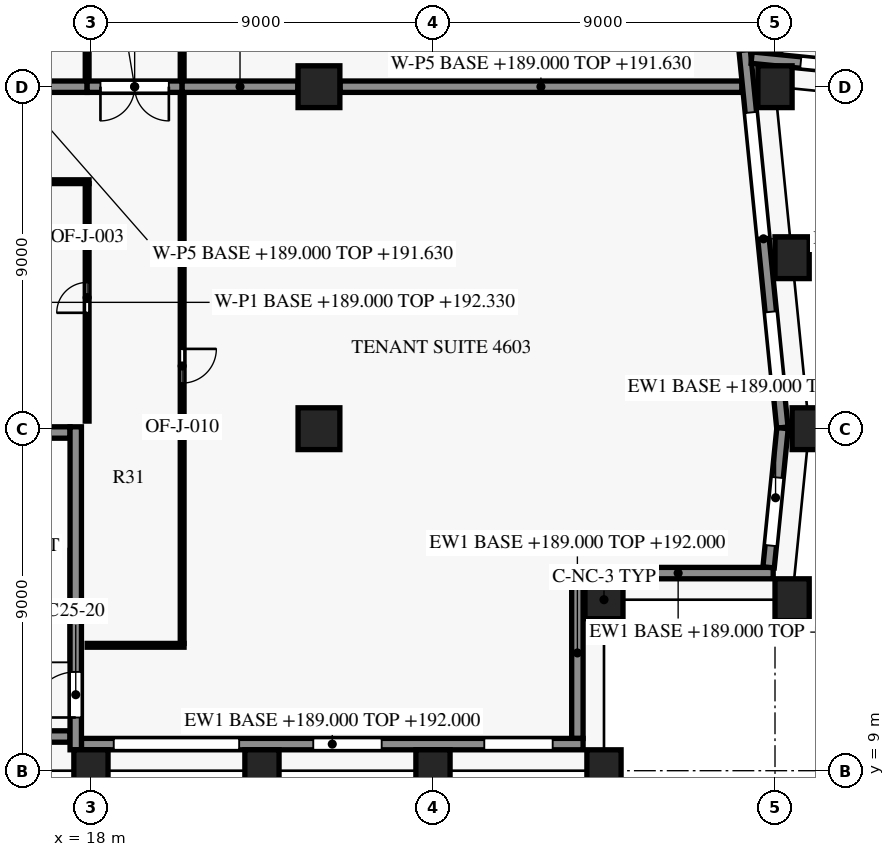
"""IFC4 building model, lengths in metres.
Left out: names, types, materials, properties, quantities, classifications, styles, units other than length and angle.
Written with IfcOpenShell. Run it as: python <this file> out.ifc"""

import sys

from ifc_helpers import new_model, si_unit, direction, frame, frame_2d, origin, origin_2d, place, context, subcontext, project, spatial, rectangle, extrude, element, fill, save


model = new_model("IFC4")
c1 = context("Model", 3, precision=1e-05, world=origin(), true_north=direction((0.0, 1.0)))
c2 = subcontext(c1, "Body", "Model", "MODEL_VIEW")
j1 = project(units=[si_unit("LENGTHUNIT", "METRE"), si_unit("PLANEANGLEUNIT", "RADIAN")], contexts=[c1])
p1 = place(None, origin())
s1 = spatial("IfcSite", under=j1, at=p1, CompositionType="ELEMENT")
p2 = place(p1, origin())
s2 = spatial("IfcBuilding", under=s1, at=p2, CompositionType="ELEMENT")
p3 = place(p2, frame((0.0, 0.0, 189.0)))
s3 = spatial("IfcBuildingStorey", under=s2, at=p3, CompositionType="ELEMENT", Elevation=189.0)
for number, where, z_axis, x_axis in (
    (1, (18.0, 9.0, 0.0), (0.0, 0.0, 1.0), (1.0, 0.0, 0.0)),
    (2, (22.5, 9.0, 0.0), (0.0, 0.0, 1.0), (1.0, 0.0, 0.0)),
    (3, (27.0, 9.0, 0.0), (0.0, 0.0, 1.0), (1.0, 0.0, 0.0)),
    (4, (31.5, 9.0, 0.0), (0.0, 0.0, 1.0), (1.0, 0.0, 0.0)),
    (5, (36.45, 13.5, 0.0), (0.0, 0.0, 1.0), (0.1, 0.995, 0.0)),
    (6, (36.9, 18.0, 0.0), (0.0, 0.0, 1.0), (0.0, 1.0, 0.0)),
    (7, (36.45, 22.5, 0.0), (0.0, 0.0, 1.0), (-0.1, 0.995, 0.0)),
    (8, (36.0, 27.0, 0.0), (0.0, 0.0, 1.0), (-0.1, 0.995, 0.0)),
):
    element("IfcColumn", number, at=place(p3, frame(where, z_axis=z_axis, x_axis=x_axis)), inside=s3, PredefinedType="COLUMN", context=c2, shape_type="SweptSolid", body=[
        extrude(rectangle(XDim=0.9, YDim=1.1, at=origin_2d()), origin(), (0.0, 0.0, 1.0), 3.8),
    ])
p4 = place(p3, frame((31.5, 13.5, 0.0), z_axis=(0.0, 0.0, 1.0), x_axis=(1.0, 0.0, 0.0)))
e9 = element("IfcColumn", 9, at=p4, inside=s3, PredefinedType="COLUMN", context=c2, shape_type="SweptSolid", body=[
    extrude(rectangle(XDim=1.0, YDim=1.0, at=origin_2d()), origin(), (0.0, 0.0, 1.0), 3.8),
])
for number, where, z_axis, x_axis in (
    (10, (24.0, 18.0, 0.0), (0.0, 0.0, 1.0), (1.0, 0.0, 0.0)),
    (11, (24.0, 27.0, 0.0), (0.0, 0.0, 1.0), (1.0, 0.0, 0.0)),
):
    element("IfcColumn", number, at=place(p3, frame(where, z_axis=z_axis, x_axis=x_axis)), inside=s3, PredefinedType="COLUMN", context=c2, shape_type="SweptSolid", body=[
        extrude(rectangle(XDim=1.1, YDim=1.1, at=origin_2d()), origin(), (0.0, 0.0, 1.0), 3.8),
    ])
p5 = place(p3, frame((30.95, 9.7, 0.0), z_axis=(0.0, 0.0, 1.0), x_axis=(-1.0, 0.0, 0.0)))
e12 = element("IfcWall", 12, at=p5, inside=s3, PredefinedType="SOLIDWALL", context=c2, shape_type="SweptSolid", body=[
    extrude(rectangle(XDim=13.2, YDim=0.3, at=frame_2d((6.6, 0.0))), origin(), (0.0, 0.0, 1.0), 3.0),
])
p6 = place(p5, frame((0.8, 0.0, 0.75)))
e13 = element("IfcOpeningElement", 13, at=p6, cuts=e12, PredefinedType="OPENING", context=c2, shape_type="SweptSolid", body=[
    extrude(rectangle(XDim=1.8, YDim=1.8, at=frame_2d((0.9, 0.9))), frame((0.0, 0.16, 0.0), z_axis=(0.0, -1.0, 0.0), x_axis=(1.0, 0.0, 0.0)), (0.0, 0.0, 1.0), 0.32),
])
p7 = place(p5, frame((5.3, 0.0, 0.75)))
e14 = element("IfcOpeningElement", 14, at=p7, cuts=e12, PredefinedType="OPENING", context=c2, shape_type="SweptSolid", body=[
    extrude(rectangle(XDim=1.8, YDim=1.8, at=frame_2d((0.9, 0.9))), frame((0.0, 0.16, 0.0), z_axis=(0.0, -1.0, 0.0), x_axis=(1.0, 0.0, 0.0)), (0.0, 0.0, 1.0), 0.32),
])
p8 = place(p5, frame((9.05, 0.0, 0.15)))
e15 = element("IfcOpeningElement", 15, at=p8, cuts=e12, PredefinedType="OPENING", context=c2, shape_type="SweptSolid", body=[
    extrude(rectangle(XDim=3.3, YDim=2.4, at=frame_2d((1.65, 1.2))), frame((0.0, 0.16, 0.0), z_axis=(0.0, -1.0, 0.0), x_axis=(1.0, 0.0, 0.0)), (0.0, 0.0, 1.0), 0.32),
])
p9 = place(p3, frame((30.8, 14.35, 0.0), z_axis=(0.0, 0.0, 1.0), x_axis=(0.0, -1.0, 0.0)))
e16 = element("IfcWall", 16, at=p9, inside=s3, PredefinedType="SOLIDWALL", context=c2, shape_type="SweptSolid", body=[
    extrude(rectangle(XDim=4.502, YDim=0.3, at=frame_2d((2.251, 0.0))), origin(), (0.0, 0.0, 1.0), 3.0),
])
p10 = place(p3, frame((35.952, 14.2, 0.0), z_axis=(0.0, 0.0, 1.0), x_axis=(-1.0, 0.0, 0.0)))
e17 = element("IfcWall", 17, at=p10, inside=s3, PredefinedType="SOLIDWALL", context=c2, shape_type="SweptSolid", body=[
    extrude(rectangle(XDim=5.002, YDim=0.3, at=frame_2d((2.501, 0.0))), origin(), (0.0, 0.0, 1.0), 3.0),
])
p11 = place(p3, frame((36.198, 18.015, 0.0), z_axis=(0.0, 0.0, 1.0), x_axis=(-0.099529980022, -0.99503456376, 0.0)))
e18 = element("IfcWall", 18, at=p11, inside=s3, PredefinedType="SOLIDWALL", context=c2, shape_type="SweptSolid", body=[
    extrude(rectangle(XDim=3.682, YDim=0.3, at=frame_2d((1.841, 0.0))), origin(), (0.0, 0.0, 1.0), 3.0),
])
p12 = place(p11, frame((1.306, 0.0, 0.75)))
e19 = element("IfcOpeningElement", 19, at=p12, cuts=e18, PredefinedType="OPENING", context=c2, shape_type="SweptSolid", body=[
    extrude(rectangle(XDim=1.8, YDim=1.8, at=frame_2d((0.9, 0.9))), frame((0.0, 0.16, 0.0), z_axis=(0.0, -1.0, 0.0), x_axis=(1.0, 0.0, 0.0)), (0.0, 0.0, 1.0), 0.32),
])
p13 = place(p3, frame((35.2, 27.964, 0.0), z_axis=(0.0, 0.0, 1.0), x_axis=(0.099501297882, -0.995037432321, 0.0)))
e20 = element("IfcWall", 20, at=p13, inside=s3, PredefinedType="SOLIDWALL", context=c2, shape_type="SweptSolid", body=[
    extrude(rectangle(XDim=9.984, YDim=0.3, at=frame_2d((4.992, 0.0))), origin(), (0.0, 0.0, 1.0), 3.0),
])
p14 = place(p13, frame((1.65, 0.0, 0.15)))
e21 = element("IfcOpeningElement", 21, at=p14, cuts=e20, PredefinedType="OPENING", context=c2, shape_type="SweptSolid", body=[
    extrude(rectangle(XDim=3.3, YDim=2.4, at=frame_2d((1.65, 1.2))), frame((0.0, 0.16, 0.0), z_axis=(0.0, -1.0, 0.0), x_axis=(1.0, 0.0, 0.0)), (0.0, 0.0, 1.0), 0.32),
])
p15 = place(p13, frame((6.923, 0.0, 0.75)))
e22 = element("IfcOpeningElement", 22, at=p15, cuts=e20, PredefinedType="OPENING", context=c2, shape_type="SweptSolid", body=[
    extrude(rectangle(XDim=1.8, YDim=1.8, at=frame_2d((0.9, 0.9))), frame((0.0, 0.16, 0.0), z_axis=(0.0, -1.0, 0.0), x_axis=(1.0, 0.0, 0.0)), (0.0, 0.0, 1.0), 0.32),
])
p16 = place(p3, frame((45.015, 26.802, 0.0), z_axis=(0.0, 0.0, 1.0), x_axis=(-0.995037689759, 0.099498723402, 0.0)))
e23 = element("IfcWall", 23, at=p16, inside=s3, PredefinedType="SOLIDWALL", context=c2, shape_type="SweptSolid", body=[
    extrude(rectangle(XDim=9.677, YDim=0.3, at=frame_2d((4.839, 0.0))), origin(), (0.0, 0.0, 1.0), 3.0),
])
p17 = place(p16, frame((1.306, 0.0, 0.75)))
e24 = element("IfcOpeningElement", 24, at=p17, cuts=e23, PredefinedType="OPENING", context=c2, shape_type="SweptSolid", body=[
    extrude(rectangle(XDim=1.8, YDim=1.8, at=frame_2d((0.9, 0.9))), frame((0.0, 0.16, 0.0), z_axis=(0.0, -1.0, 0.0), x_axis=(1.0, 0.0, 0.0)), (0.0, 0.0, 1.0), 0.32),
])
p18 = place(p16, frame((5.079, 0.0, 0.15)))
e25 = element("IfcOpeningElement", 25, at=p18, cuts=e23, PredefinedType="OPENING", context=c2, shape_type="SweptSolid", body=[
    extrude(rectangle(XDim=3.3, YDim=2.4, at=frame_2d((1.65, 1.2))), frame((0.0, 0.16, 0.0), z_axis=(0.0, -1.0, 0.0), x_axis=(1.0, 0.0, 0.0)), (0.0, 0.0, 1.0), 0.32),
])
for number, where, z_axis, x_axis in (
    (26, (14.15, 9.9, 0.0), (0.0, 0.0, 1.0), (1.0, 0.0, 0.0)),
    (27, (14.15, 17.9, 0.0), (0.0, 0.0, 1.0), (1.0, 0.0, 0.0)),
):
    element("IfcWall", number, at=place(p3, frame(where, z_axis=z_axis, x_axis=x_axis)), inside=s3, PredefinedType="SHEAR", context=c2, shape_type="SweptSolid", body=[
        extrude(rectangle(XDim=3.3, YDim=0.3, at=frame_2d((1.65, 0.0))), origin(), (0.0, 0.0, 1.0), 3.5),
    ])
p19 = place(p3, frame((17.6, 9.55, 0.0), z_axis=(0.0, 0.0, 1.0), x_axis=(0.0, 1.0, 0.0)))
e28 = element("IfcWall", 28, at=p19, inside=s3, PredefinedType="SHEAR", context=c2, shape_type="SweptSolid", body=[
    extrude(rectangle(XDim=8.5, YDim=0.3, at=frame_2d((4.25, 0.0))), origin(), (0.0, 0.0, 1.0), 3.5),
])
p20 = place(p19, frame((0.85, 0.0, 0.0)))
e29 = element("IfcOpeningElement", 29, at=p20, cuts=e28, PredefinedType="OPENING", context=c2, shape_type="SweptSolid", body=[
    extrude(rectangle(XDim=1.2, YDim=2.2, at=frame_2d((0.6, 1.1))), frame((0.0, 0.16, 0.0), z_axis=(0.0, -1.0, 0.0), x_axis=(1.0, 0.0, 0.0)), (0.0, 0.0, 1.0), 0.32),
])
p21 = place(p3, frame((20.45, 12.3, 0.0), z_axis=(0.0, 0.0, 1.0), x_axis=(-1.0, 0.0, 0.0)))
e30 = element("IfcWall", 30, at=p21, inside=s3, PredefinedType="PARTITIONING", context=c2, shape_type="SweptSolid", body=[
    extrude(rectangle(XDim=2.55, YDim=0.1, at=frame_2d((1.275, 0.0))), origin(), (0.0, 0.0, 1.0), 2.63),
])
p22 = place(p3, frame((17.9, 18.2, 0.0), z_axis=(0.0, 0.0, 1.0), x_axis=(0.0, 1.0, 0.0)))
e31 = element("IfcWall", 31, at=p22, inside=s3, PredefinedType="PARTITIONING", context=c2, shape_type="SweptSolid", body=[
    extrude(rectangle(XDim=6.25, YDim=0.1, at=frame_2d((3.125, 0.0))), origin(), (0.0, 0.0, 1.0), 2.63),
])
p23 = place(p22, frame((2.85, 0.0, 0.0)))
e32 = element("IfcOpeningElement", 32, at=p23, cuts=e31, PredefinedType="OPENING", context=c2, shape_type="SweptSolid", body=[
    extrude(rectangle(XDim=0.8, YDim=2.1, at=frame_2d((0.4, 1.05))), frame((0.0, 0.06, 0.0), z_axis=(0.0, -1.0, 0.0), x_axis=(1.0, 0.0, 0.0)), (0.0, 0.0, 1.0), 0.12),
])
p24 = place(p3, frame((17.95, 24.5, 0.0), z_axis=(0.0, 0.0, 1.0), x_axis=(-1.0, 0.0, 0.0)))
e33 = element("IfcWall", 33, at=p24, inside=s3, PredefinedType="PARTITIONING", context=c2, shape_type="SweptSolid", body=[
    extrude(rectangle(XDim=4.0, YDim=0.1, at=frame_2d((2.0, 0.0))), origin(), (0.0, 0.0, 1.0), 2.63),
])
p25 = place(p3, frame((20.4, 26.83, 0.0), z_axis=(0.0, 0.0, 1.0), x_axis=(0.0, -1.0, 0.0)))
e34 = element("IfcWall", 34, at=p25, inside=s3, PredefinedType="PARTITIONING", context=c2, shape_type="SweptSolid", body=[
    extrude(rectangle(XDim=14.48, YDim=0.1, at=frame_2d((7.24, 0.0))), origin(), (0.0, 0.0, 1.0), 2.63),
])
p26 = place(p25, frame((6.73, 0.0, 0.0)))
e35 = element("IfcOpeningElement", 35, at=p26, cuts=e34, PredefinedType="OPENING", context=c2, shape_type="SweptSolid", body=[
    extrude(rectangle(XDim=0.9, YDim=2.1, at=frame_2d((0.45, 1.05))), frame((0.0, 0.06, 0.0), z_axis=(0.0, -1.0, 0.0), x_axis=(1.0, 0.0, 0.0)), (0.0, 0.0, 1.0), 0.12),
])
p27 = place(p3, frame((14.0, 27.0, 0.0), z_axis=(0.0, 0.0, 1.0), x_axis=(1.0, 0.0, 0.0)))
e36 = element("IfcWall", 36, at=p27, inside=s3, PredefinedType="PARTITIONING", context=c2, shape_type="SweptSolid", body=[
    extrude(rectangle(XDim=3.9, YDim=0.3, at=frame_2d((1.95, 0.0))), origin(), (0.0, 0.0, 1.0), 2.63),
])
p28 = place(p3, frame((20.4, 27.0, 0.0), z_axis=(0.0, 0.0, 1.0), x_axis=(-1.0, 0.0, 0.0)))
e37 = element("IfcWall", 37, at=p28, inside=s3, PredefinedType="PARTITIONING", context=c2, shape_type="SweptSolid", body=[
    extrude(rectangle(XDim=2.5, YDim=0.3, at=frame_2d((1.25, 0.0))), origin(), (0.0, 0.0, 1.0), 2.63),
])
p29 = place(p28, frame((0.35, 0.0, 0.0)))
e38 = element("IfcOpeningElement", 38, at=p29, cuts=e37, PredefinedType="OPENING", context=c2, shape_type="SweptSolid", body=[
    extrude(rectangle(XDim=1.8, YDim=2.1, at=frame_2d((0.9, 1.05))), frame((0.0, 0.16, 0.0), z_axis=(0.0, -1.0, 0.0), x_axis=(1.0, 0.0, 0.0)), (0.0, 0.0, 1.0), 0.32),
])
p30 = place(p3, frame((20.4, 27.0, 0.0), z_axis=(0.0, 0.0, 1.0), x_axis=(1.0, 0.0, 0.0)))
e39 = element("IfcWall", 39, at=p30, inside=s3, PredefinedType="PARTITIONING", context=c2, shape_type="SweptSolid", body=[
    extrude(rectangle(XDim=3.045, YDim=0.3, at=frame_2d((1.522, 0.0))), origin(), (0.0, 0.0, 1.0), 2.63),
])
p31 = place(p3, frame((24.555, 27.0, 0.0), z_axis=(0.0, 0.0, 1.0), x_axis=(1.0, 0.0, 0.0)))
e40 = element("IfcWall", 40, at=p31, inside=s3, PredefinedType="PARTITIONING", context=c2, shape_type="SweptSolid", body=[
    extrude(rectangle(XDim=10.571, YDim=0.3, at=frame_2d((5.285, 0.0))), origin(), (0.0, 0.0, 1.0), 2.63),
])
p32 = place(p3, frame((17.9, 27.17, 0.0), z_axis=(0.0, 0.0, 1.0), x_axis=(0.0, 1.0, 0.0)))
e41 = element("IfcWall", 41, at=p32, inside=s3, PredefinedType="PARTITIONING", context=c2, shape_type="SweptSolid", body=[
    extrude(rectangle(XDim=6.28, YDim=0.1, at=frame_2d((3.14, 0.0))), origin(), (0.0, 0.0, 1.0), 2.63),
])
p33 = place(p3, frame((36.0, 27.874, 0.0), z_axis=(0.0, 0.0, 1.0), x_axis=(0.0, 1.0, 0.0)))
e42 = element("IfcWall", 42, at=p33, inside=s3, PredefinedType="PARTITIONING", context=c2, shape_type="SweptSolid", body=[
    extrude(rectangle(XDim=4.076, YDim=0.3, at=frame_2d((2.038, 0.0))), origin(), (0.0, 0.0, 1.0), 2.63),
])
p34 = place(p3, frame((20.4, 33.45, 0.0), z_axis=(0.0, 0.0, 1.0), x_axis=(0.0, -1.0, 0.0)))
e43 = element("IfcWall", 43, at=p34, inside=s3, PredefinedType="PARTITIONING", context=c2, shape_type="SweptSolid", body=[
    extrude(rectangle(XDim=6.28, YDim=0.1, at=frame_2d((3.14, 0.0))), origin(), (0.0, 0.0, 1.0), 2.63),
])
p35 = place(p6, origin())
e44 = element("IfcWindow", 44, at=p35, inside=s3, PartitioningType="SINGLE_PANEL", PredefinedType="WINDOW", context=c2, shape_type="SweptSolid", body=[
    extrude(rectangle(XDim=1.8, YDim=1.8, at=frame_2d((0.9, 0.9))), frame((0.0, 0.03, 0.0), z_axis=(0.0, -1.0, 0.0), x_axis=(1.0, 0.0, 0.0)), (0.0, 0.0, 1.0), 0.06),
])
fill(e13, e44)
p36 = place(p7, origin())
e45 = element("IfcWindow", 45, at=p36, inside=s3, PartitioningType="SINGLE_PANEL", PredefinedType="WINDOW", context=c2, shape_type="SweptSolid", body=[
    extrude(rectangle(XDim=1.8, YDim=1.8, at=frame_2d((0.9, 0.9))), frame((0.0, 0.03, 0.0), z_axis=(0.0, -1.0, 0.0), x_axis=(1.0, 0.0, 0.0)), (0.0, 0.0, 1.0), 0.06),
])
fill(e14, e45)
p37 = place(p8, origin())
e46 = element("IfcWindow", 46, at=p37, inside=s3, PartitioningType="SINGLE_PANEL", PredefinedType="WINDOW", context=c2, shape_type="SweptSolid", body=[
    extrude(rectangle(XDim=3.3, YDim=2.4, at=frame_2d((1.65, 1.2))), frame((0.0, 0.03, 0.0), z_axis=(0.0, -1.0, 0.0), x_axis=(1.0, 0.0, 0.0)), (0.0, 0.0, 1.0), 0.06),
])
fill(e15, e46)
p38 = place(p12, origin())
e47 = element("IfcWindow", 47, at=p38, inside=s3, PartitioningType="SINGLE_PANEL", PredefinedType="WINDOW", context=c2, shape_type="SweptSolid", body=[
    extrude(rectangle(XDim=1.8, YDim=1.8, at=frame_2d((0.9, 0.9))), frame((0.0, 0.03, 0.0), z_axis=(0.0, -1.0, 0.0), x_axis=(1.0, 0.0, 0.0)), (0.0, 0.0, 1.0), 0.06),
])
fill(e19, e47)
p39 = place(p14, origin())
e48 = element("IfcWindow", 48, at=p39, inside=s3, PartitioningType="SINGLE_PANEL", PredefinedType="WINDOW", context=c2, shape_type="SweptSolid", body=[
    extrude(rectangle(XDim=3.3, YDim=2.4, at=frame_2d((1.65, 1.2))), frame((0.0, 0.03, 0.0), z_axis=(0.0, -1.0, 0.0), x_axis=(1.0, 0.0, 0.0)), (0.0, 0.0, 1.0), 0.06),
])
fill(e21, e48)
p40 = place(p15, origin())
e49 = element("IfcWindow", 49, at=p40, inside=s3, PartitioningType="SINGLE_PANEL", PredefinedType="WINDOW", context=c2, shape_type="SweptSolid", body=[
    extrude(rectangle(XDim=1.8, YDim=1.8, at=frame_2d((0.9, 0.9))), frame((0.0, 0.03, 0.0), z_axis=(0.0, -1.0, 0.0), x_axis=(1.0, 0.0, 0.0)), (0.0, 0.0, 1.0), 0.06),
])
fill(e22, e49)
p41 = place(p18, origin())
e50 = element("IfcWindow", 50, at=p41, inside=s3, PartitioningType="SINGLE_PANEL", PredefinedType="WINDOW", context=c2, shape_type="SweptSolid", body=[
    extrude(rectangle(XDim=3.3, YDim=2.4, at=frame_2d((1.65, 1.2))), frame((0.0, 0.03, 0.0), z_axis=(0.0, -1.0, 0.0), x_axis=(1.0, 0.0, 0.0)), (0.0, 0.0, 1.0), 0.06),
])
fill(e25, e50)
p42 = place(p20, origin())
e51 = element("IfcDoor", 51, at=p42, inside=s3, OperationType="SINGLE_SWING_LEFT", PredefinedType="DOOR", context=c2, shape_type="SweptSolid", body=[
    extrude(rectangle(XDim=1.2, YDim=2.2, at=frame_2d((0.6, 1.1))), frame((0.0, 0.025, 0.0), z_axis=(0.0, -1.0, 0.0), x_axis=(1.0, 0.0, 0.0)), (0.0, 0.0, 1.0), 0.05),
])
fill(e29, e51)
p43 = place(p23, origin())
e52 = element("IfcDoor", 52, at=p43, inside=s3, OperationType="SINGLE_SWING_LEFT", PredefinedType="DOOR", context=c2, shape_type="SweptSolid", body=[
    extrude(rectangle(XDim=0.8, YDim=2.1, at=frame_2d((0.4, 1.05))), frame((0.0, 0.025, 0.0), z_axis=(0.0, -1.0, 0.0), x_axis=(1.0, 0.0, 0.0)), (0.0, 0.0, 1.0), 0.05),
])
fill(e32, e52)
p44 = place(p26, origin())
e53 = element("IfcDoor", 53, at=p44, inside=s3, OperationType="SINGLE_SWING_LEFT", PredefinedType="DOOR", context=c2, shape_type="SweptSolid", body=[
    extrude(rectangle(XDim=0.9, YDim=2.1, at=frame_2d((0.45, 1.05))), frame((0.0, 0.025, 0.0), z_axis=(0.0, -1.0, 0.0), x_axis=(1.0, 0.0, 0.0)), (0.0, 0.0, 1.0), 0.05),
])
fill(e35, e53)
p45 = place(p29, origin())
e54 = element("IfcDoor", 54, at=p45, inside=s3, OperationType="DOUBLE_DOOR_SINGLE_SWING", PredefinedType="DOOR", context=c2, shape_type="SweptSolid", body=[
    extrude(rectangle(XDim=1.8, YDim=2.1, at=frame_2d((0.9, 1.05))), frame((0.0, 0.025, 0.0), z_axis=(0.0, -1.0, 0.0), x_axis=(1.0, 0.0, 0.0)), (0.0, 0.0, 1.0), 0.05),
])
fill(e38, e54)
save(model, sys.argv[1])
